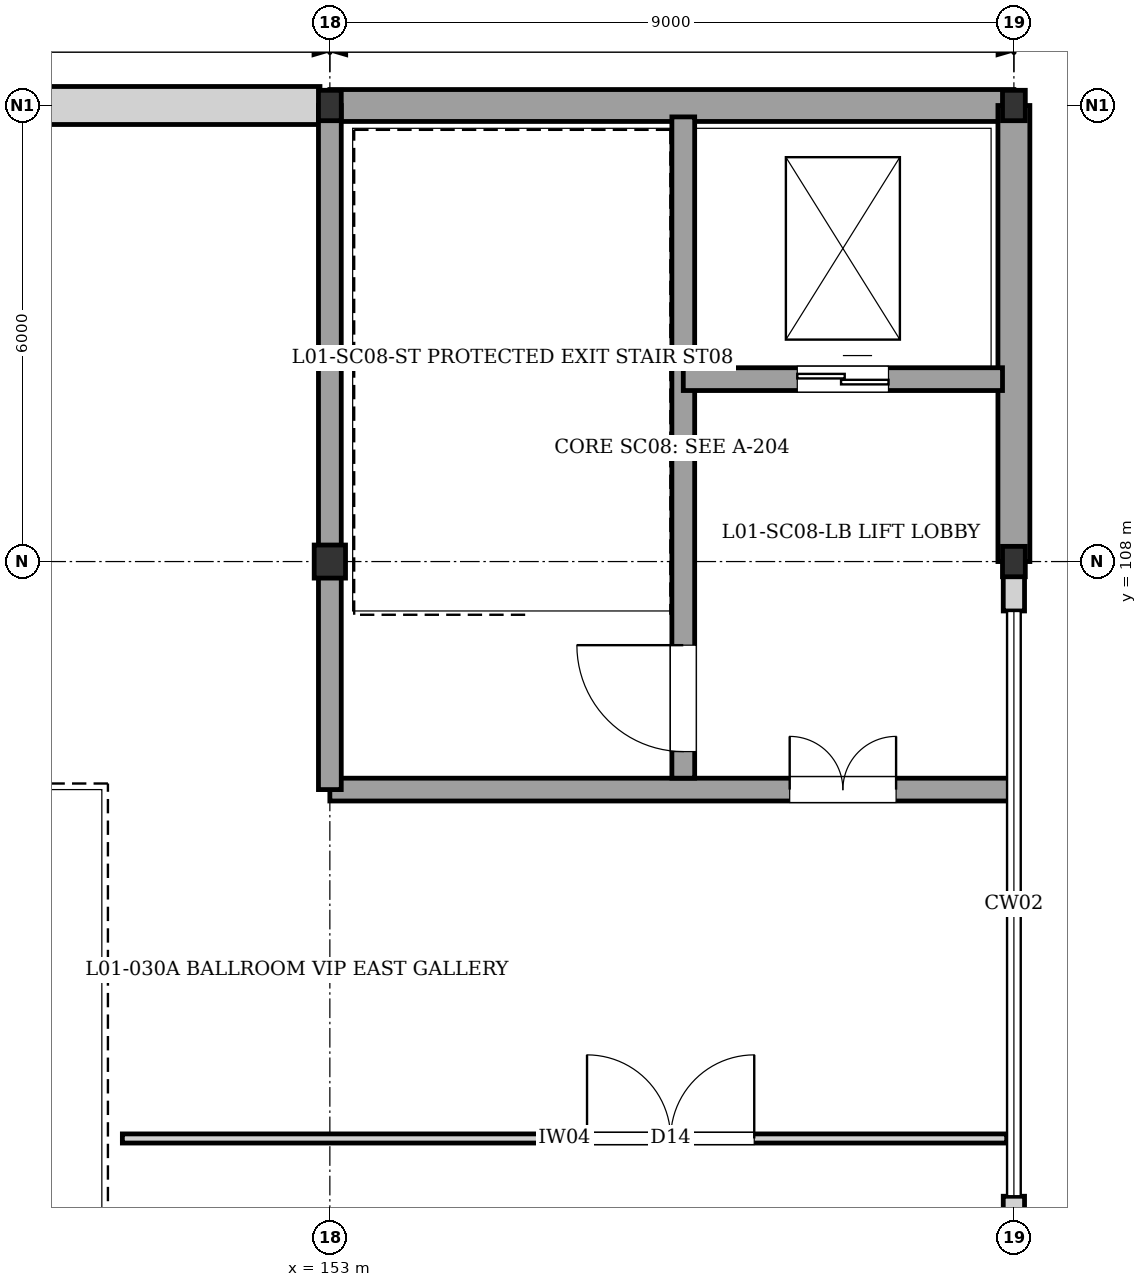
"""IFC4 building model, lengths in metres.
Left out: names, types, materials, properties, quantities, classifications, styles, units other than length and angle.
Written with IfcOpenShell. Run it as: python <this file> out.ifc"""

import sys

from ifc_helpers import new_model, si_unit, direction, frame, frame_2d, origin, origin_2d, place, context, subcontext, project, spatial, rectangle, i_section, extrude, element, fill, save


model = new_model("IFC4")
c1 = context("Model", 3, precision=1e-05, world=origin(), true_north=direction((0.0, 1.0)))
c2 = subcontext(c1, "Body", "Model", "MODEL_VIEW")
j1 = project(units=[si_unit("LENGTHUNIT", "METRE"), si_unit("PLANEANGLEUNIT", "RADIAN")], contexts=[c1])
p1 = place(None, origin())
s1 = spatial("IfcSite", under=j1, at=p1, CompositionType="ELEMENT")
p2 = place(p1, origin())
s2 = spatial("IfcBuilding", under=s1, at=p2, CompositionType="ELEMENT")
p3 = place(p2, frame((0.0, 0.0, 4.32)))
s3 = spatial("IfcBuildingStorey", under=s2, at=p3, CompositionType="ELEMENT", Elevation=4.32)
p4 = place(p3, frame((153.0, 108.0, 0.0), z_axis=(0.0, 0.0, 1.0), x_axis=(1.0, 0.0, 0.0)))
e1 = element("IfcColumn", 1, at=p4, inside=s3, PredefinedType="COLUMN", context=c2, shape_type="SweptSolid", body=[
    extrude(i_section(OverallWidth=0.412, OverallDepth=0.435, WebThickness=0.027, FlangeThickness=0.046, at=origin_2d()), origin(), (0.0, 0.0, 1.0), 3.84),
])
for number, where, z_axis, x_axis in (
    (2, (153.0, 114.0, 0.0), (0.0, 0.0, 1.0), (1.0, 0.0, 0.0)),
    (3, (162.0, 108.0, 0.0), (0.0, 0.0, 1.0), (1.0, 0.0, 0.0)),
    (4, (162.0, 114.0, 0.0), (0.0, 0.0, 1.0), (1.0, 0.0, 0.0)),
):
    element("IfcColumn", number, at=place(p3, frame(where, z_axis=z_axis, x_axis=x_axis)), inside=s3, PredefinedType="COLUMN", context=c2, shape_type="SweptSolid", body=[
        extrude(i_section(OverallWidth=0.3, OverallDepth=0.4, WebThickness=0.013, FlangeThickness=0.024, at=origin_2d()), origin(), (0.0, 0.0, 1.0), 3.84),
    ])
p5 = place(p3, frame((144.0, 114.0, 0.0), z_axis=(0.0, 0.0, 1.0), x_axis=(1.0, 0.0, 0.0)))
e5 = element("IfcWall", 5, at=p5, inside=s3, PredefinedType="SOLIDWALL", context=c2, shape_type="SweptSolid", body=[
    extrude(rectangle(XDim=8.87, YDim=0.5, at=frame_2d((4.435, 0.0))), origin(), (0.0, 0.0, 1.0), 3.18),
])
p6 = place(p3, frame((153.0, 114.0, 0.0), z_axis=(0.0, 0.0, 1.0), x_axis=(1.0, 0.0, 0.0)))
e6 = element("IfcWall", 6, at=p6, inside=s3, PredefinedType="SOLIDWALL", context=c2, shape_type="SweptSolid", body=[
    extrude(rectangle(XDim=9.0, YDim=0.42, at=frame_2d((4.5, 0.0))), origin(), (0.0, 0.0, 1.0), 3.6),
])
p7 = place(p3, frame((162.0, 114.0, 0.0), z_axis=(0.0, 0.0, 1.0), x_axis=(0.0, -1.0, 0.0)))
e7 = element("IfcWall", 7, at=p7, inside=s3, PredefinedType="SOLIDWALL", context=c2, shape_type="SweptSolid", body=[
    extrude(rectangle(XDim=6.0, YDim=0.42, at=frame_2d((3.0, 0.0))), origin(), (0.0, 0.0, 1.0), 3.6),
])
for number, where, z_axis, x_axis in (
    (8, (162.0, 108.0, 0.0), (0.0, 0.0, 1.0), (0.0, -1.0, 0.0)),
    (9, (162.0, 99.65, 0.0), (0.0, 0.0, 1.0), (0.0, -1.0, 0.0)),
):
    element("IfcWall", number, at=place(p3, frame(where, z_axis=z_axis, x_axis=x_axis)), inside=s3, PredefinedType="SOLIDWALL", context=c2, shape_type="SweptSolid", body=[
        extrude(rectangle(XDim=0.65, YDim=0.28, at=frame_2d((0.325, 0.0))), origin(), (0.0, 0.0, 1.0), 3.18),
    ])
p8 = place(p3, frame((153.0, 105.0, 0.0), z_axis=(0.0, 0.0, 1.0), x_axis=(1.0, 0.0, 0.0)))
e10 = element("IfcWall", 10, at=p8, inside=s3, PredefinedType="SHEAR", context=c2, shape_type="SweptSolid", body=[
    extrude(rectangle(XDim=9.0, YDim=0.3, at=frame_2d((4.5, 0.0))), origin(), (0.0, 0.0, 1.0), 3.6),
])
p9 = place(p8, frame((6.05, 0.0, 0.0)))
e11 = element("IfcOpeningElement", 11, at=p9, cuts=e10, PredefinedType="OPENING", context=c2, shape_type="SweptSolid", body=[
    extrude(rectangle(XDim=1.4, YDim=2.02, at=frame_2d((0.7, 1.01))), frame((0.0, 0.16, 0.0), z_axis=(0.0, -1.0, 0.0), x_axis=(1.0, 0.0, 0.0)), (0.0, 0.0, 1.0), 0.32),
])
p10 = place(p3, frame((153.0, 105.0, 0.0), z_axis=(0.0, 0.0, 1.0), x_axis=(0.0, 1.0, 0.0)))
e12 = element("IfcWall", 12, at=p10, inside=s3, PredefinedType="SHEAR", context=c2, shape_type="SweptSolid", body=[
    extrude(rectangle(XDim=9.0, YDim=0.3, at=frame_2d((4.5, 0.0))), origin(), (0.0, 0.0, 1.0), 3.6),
])
p11 = place(p3, frame((157.65, 105.15, 0.0), z_axis=(0.0, 0.0, 1.0), x_axis=(0.0, 1.0, 0.0)))
e13 = element("IfcWall", 13, at=p11, inside=s3, PredefinedType="SHEAR", context=c2, shape_type="SweptSolid", body=[
    extrude(rectangle(XDim=8.7, YDim=0.3, at=frame_2d((4.35, 0.0))), origin(), (0.0, 0.0, 1.0), 3.6),
])
p12 = place(p11, frame((0.35, 0.0, 0.0)))
e14 = element("IfcOpeningElement", 14, at=p12, cuts=e13, PredefinedType="OPENING", context=c2, shape_type="SweptSolid", body=[
    extrude(rectangle(XDim=1.4, YDim=2.02, at=frame_2d((0.7, 1.01))), frame((0.0, 0.16, 0.0), z_axis=(0.0, -1.0, 0.0), x_axis=(1.0, 0.0, 0.0)), (0.0, 0.0, 1.0), 0.32),
])
p13 = place(p3, frame((157.65, 110.4, 0.0), z_axis=(0.0, 0.0, 1.0), x_axis=(1.0, 0.0, 0.0)))
e15 = element("IfcWall", 15, at=p13, inside=s3, PredefinedType="SHEAR", context=c2, shape_type="SweptSolid", body=[
    extrude(rectangle(XDim=4.2, YDim=0.3, at=frame_2d((2.1, 0.0))), origin(), (0.0, 0.0, 1.0), 3.6),
])
p14 = place(p13, frame((1.5, 0.0, 0.0)))
e16 = element("IfcOpeningElement", 16, at=p14, cuts=e15, PredefinedType="OPENING", context=c2, shape_type="SweptSolid", body=[
    extrude(rectangle(XDim=1.2, YDim=2.2, at=frame_2d((0.6, 1.1))), frame((0.0, 0.16, 0.0), z_axis=(0.0, -1.0, 0.0), x_axis=(1.0, 0.0, 0.0)), (0.0, 0.0, 1.0), 0.32),
])
p15 = place(p3, frame((150.27, 100.41, 0.0), z_axis=(0.0, 0.0, 1.0), x_axis=(1.0, 0.0, 0.0)))
e17 = element("IfcWall", 17, at=p15, inside=s3, PredefinedType="PARTITIONING", context=c2, shape_type="SweptSolid", body=[
    extrude(rectangle(XDim=11.635, YDim=0.12, at=frame_2d((5.817, 0.0))), origin(), (0.0, 0.0, 1.0), 3.6),
])
p16 = place(p15, frame((6.114, 0.0, 0.0)))
e18 = element("IfcOpeningElement", 18, at=p16, cuts=e17, PredefinedType="OPENING", context=c2, shape_type="SweptSolid", body=[
    extrude(rectangle(XDim=2.2, YDim=2.45, at=frame_2d((1.1, 1.225))), frame((0.0, 0.07, 0.0), z_axis=(0.0, -1.0, 0.0), x_axis=(1.0, 0.0, 0.0)), (0.0, 0.0, 1.0), 0.14),
])
p17 = place(p9, origin())
e19 = element("IfcDoor", 19, at=p17, inside=s3, OperationType="DOUBLE_DOOR_SINGLE_SWING", PredefinedType="DOOR", context=c2, shape_type="SweptSolid", body=[
    extrude(rectangle(XDim=1.4, YDim=2.02, at=frame_2d((0.7, 1.01))), frame((0.0, 0.025, 0.0), z_axis=(0.0, -1.0, 0.0), x_axis=(1.0, 0.0, 0.0)), (0.0, 0.0, 1.0), 0.05),
])
fill(e11, e19)
p18 = place(p12, origin())
e20 = element("IfcDoor", 20, at=p18, inside=s3, OperationType="SINGLE_SWING_RIGHT", PredefinedType="DOOR", context=c2, shape_type="SweptSolid", body=[
    extrude(rectangle(XDim=1.4, YDim=2.02, at=frame_2d((0.7, 1.01))), frame((0.0, 0.025, 0.0), z_axis=(0.0, -1.0, 0.0), x_axis=(1.0, 0.0, 0.0)), (0.0, 0.0, 1.0), 0.05),
])
fill(e14, e20)
p19 = place(p14, origin())
e21 = element("IfcDoor", 21, at=p19, inside=s3, OperationType="DOUBLE_DOOR_SLIDING", PredefinedType="DOOR", context=c2, shape_type="SweptSolid", body=[
    extrude(rectangle(XDim=1.2, YDim=2.2, at=frame_2d((0.6, 1.1))), frame((0.0, 0.025, 0.0), z_axis=(0.0, -1.0, 0.0), x_axis=(1.0, 0.0, 0.0)), (0.0, 0.0, 1.0), 0.05),
])
fill(e16, e21)
p20 = place(p16, origin())
e22 = element("IfcDoor", 22, at=p20, inside=s3, OperationType="DOUBLE_DOOR_SINGLE_SWING", PredefinedType="DOOR", context=c2, shape_type="SweptSolid", body=[
    extrude(rectangle(XDim=2.2, YDim=2.45, at=frame_2d((1.1, 1.225))), frame((0.0, 0.025, 0.0), z_axis=(0.0, -1.0, 0.0), x_axis=(1.0, 0.0, 0.0)), (0.0, 0.0, 1.0), 0.05),
])
fill(e18, e22)
save(model, sys.argv[1])
